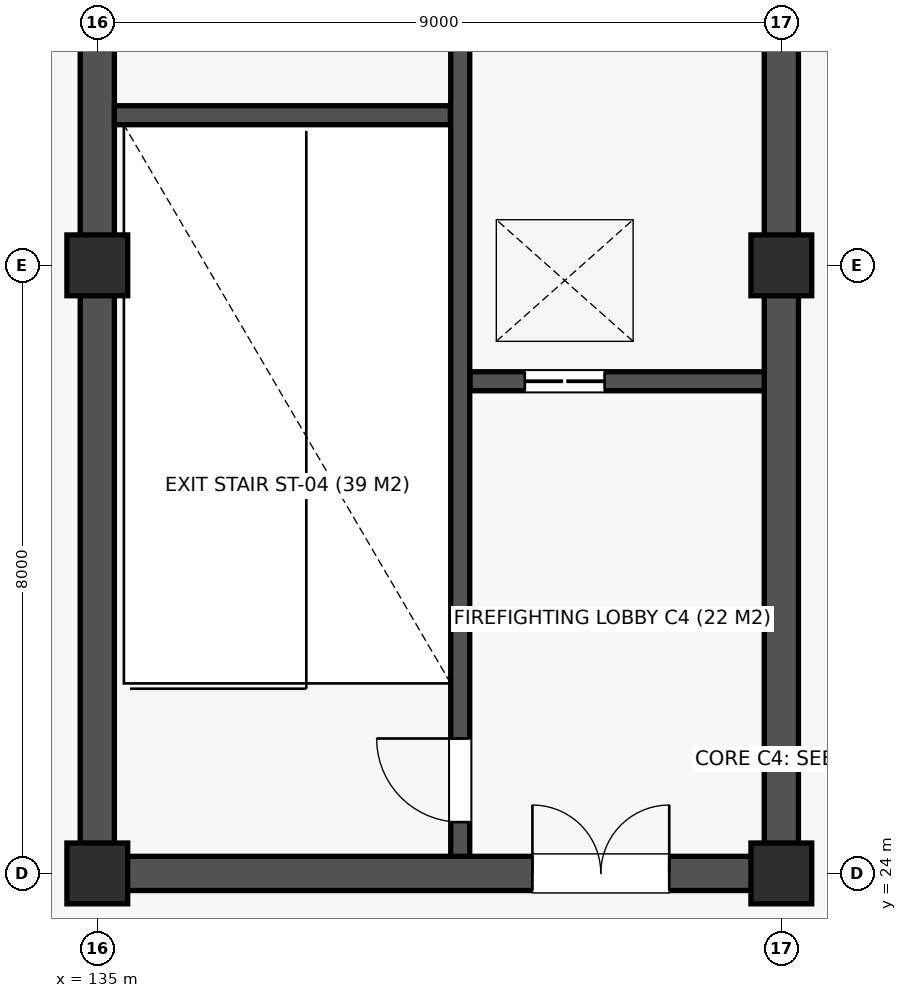
"""IFC4 building model, lengths in metres.
Left out: names, types, materials, properties, quantities, classifications, styles, units other than length and angle.
Written with IfcOpenShell. Run it as: python <this file> out.ifc"""

import sys

from ifc_helpers import new_model, si_unit, direction, frame, frame_2d, origin, origin_2d, place, context, subcontext, project, spatial, rectangle, extrude, element, fill, save


model = new_model("IFC4")
c1 = context("Model", 3, precision=1e-05, world=origin(), true_north=direction((0.0, 1.0)))
c2 = subcontext(c1, "Body", "Model", "MODEL_VIEW")
j1 = project(units=[si_unit("LENGTHUNIT", "METRE"), si_unit("PLANEANGLEUNIT", "RADIAN")], contexts=[c1])
p1 = place(None, origin())
s1 = spatial("IfcSite", under=j1, at=p1, CompositionType="ELEMENT")
p2 = place(p1, origin())
s2 = spatial("IfcBuilding", under=s1, at=p2, CompositionType="ELEMENT")
p3 = place(p2, frame((0.0, 0.0, 13.5)))
s3 = spatial("IfcBuildingStorey", under=s2, at=p3, CompositionType="ELEMENT", Elevation=13.5)
for number, where, z_axis, x_axis in (
    (1, (135.0, 24.0, 0.0), (0.0, 0.0, 1.0), (1.0, 0.0, 0.0)),
    (2, (135.0, 32.0, 0.0), (0.0, 0.0, 1.0), (1.0, 0.0, 0.0)),
    (3, (144.0, 24.0, 0.0), (0.0, 0.0, 1.0), (1.0, 0.0, 0.0)),
    (4, (144.0, 32.0, 0.0), (0.0, 0.0, 1.0), (1.0, 0.0, 0.0)),
):
    element("IfcColumn", number, at=place(p3, frame(where, z_axis=z_axis, x_axis=x_axis)), inside=s3, PredefinedType="COLUMN", context=c2, shape_type="SweptSolid", body=[
        extrude(rectangle(XDim=0.8, YDim=0.8, at=origin_2d()), origin(), (0.0, 0.0, 1.0), 4.2),
    ])
p4 = place(p3, frame((135.225, 24.0, 0.0), z_axis=(0.0, 0.0, 1.0), x_axis=(1.0, 0.0, 0.0)))
e5 = element("IfcWall", 5, at=p4, inside=s3, PredefinedType="SHEAR", context=c2, shape_type="SweptSolid", body=[
    extrude(rectangle(XDim=8.55, YDim=0.45, at=frame_2d((4.275, 0.0))), origin(), (0.0, 0.0, 1.0), 4.2),
])
p5 = place(p4, frame((5.5, 0.0, 0.0)))
e6 = element("IfcOpeningElement", 6, at=p5, cuts=e5, PredefinedType="OPENING", context=c2, shape_type="SweptSolid", body=[
    extrude(rectangle(XDim=1.8, YDim=2.18, at=frame_2d((0.9, 1.09))), frame((0.0, 0.237, 0.0), z_axis=(0.0, -1.0, 0.0), x_axis=(1.0, 0.0, 0.0)), (0.0, 0.0, 1.0), 0.474),
])
p6 = place(p3, frame((135.0, 24.225, 0.0), z_axis=(0.0, 0.0, 1.0), x_axis=(0.0, 1.0, 0.0)))
e7 = element("IfcWall", 7, at=p6, inside=s3, PredefinedType="SHEAR", context=c2, shape_type="SweptSolid", body=[
    extrude(rectangle(XDim=15.55, YDim=0.45, at=frame_2d((7.775, 0.0))), origin(), (0.0, 0.0, 1.0), 4.2),
])
p7 = place(p6, frame((11.2, 0.0, 0.0)))
e8 = element("IfcOpeningElement", 8, at=p7, cuts=e7, PredefinedType="OPENING", context=c2, shape_type="SweptSolid", body=[
    extrude(rectangle(XDim=0.95, YDim=2.1, at=frame_2d((0.475, 1.05))), frame((0.0, 0.237, 0.0), z_axis=(0.0, -1.0, 0.0), x_axis=(1.0, 0.0, 0.0)), (0.0, 0.0, 1.0), 0.474),
])
p8 = place(p3, frame((144.0, 24.225, 0.0), z_axis=(0.0, 0.0, 1.0), x_axis=(0.0, 1.0, 0.0)))
e9 = element("IfcWall", 9, at=p8, inside=s3, PredefinedType="SHEAR", context=c2, shape_type="SweptSolid", body=[
    extrude(rectangle(XDim=15.55, YDim=0.45, at=frame_2d((7.775, 0.0))), origin(), (0.0, 0.0, 1.0), 4.2),
])
p9 = place(p3, frame((139.775, 24.225, 0.0), z_axis=(0.0, 0.0, 1.0), x_axis=(0.0, 1.0, 0.0)))
e10 = element("IfcWall", 10, at=p9, inside=s3, PredefinedType="SOLIDWALL", context=c2, shape_type="SweptSolid", body=[
    extrude(rectangle(XDim=15.55, YDim=0.25, at=frame_2d((7.775, 0.0))), origin(), (0.0, 0.0, 1.0), 4.2),
])
p10 = place(p9, frame((0.45, 0.0, 0.0)))
e11 = element("IfcOpeningElement", 11, at=p10, cuts=e10, PredefinedType="OPENING", context=c2, shape_type="SweptSolid", body=[
    extrude(rectangle(XDim=1.1, YDim=2.15, at=frame_2d((0.55, 1.075))), frame((0.0, 0.137, 0.0), z_axis=(0.0, -1.0, 0.0), x_axis=(1.0, 0.0, 0.0)), (0.0, 0.0, 1.0), 0.274),
])
p11 = place(p3, frame((135.225, 33.975, 0.0), z_axis=(0.0, 0.0, 1.0), x_axis=(1.0, 0.0, 0.0)))
e12 = element("IfcWall", 12, at=p11, inside=s3, PredefinedType="SOLIDWALL", context=c2, shape_type="SweptSolid", body=[
    extrude(rectangle(XDim=4.42, YDim=0.25, at=frame_2d((2.21, 0.0))), origin(), (0.0, 0.0, 1.0), 4.2),
])
p12 = place(p3, frame((139.905, 30.475, 0.0), z_axis=(0.0, 0.0, 1.0), x_axis=(1.0, 0.0, 0.0)))
e13 = element("IfcWall", 13, at=p12, inside=s3, PredefinedType="SOLIDWALL", context=c2, shape_type="SweptSolid", body=[
    extrude(rectangle(XDim=3.87, YDim=0.25, at=frame_2d((1.935, 0.0))), origin(), (0.0, 0.0, 1.0), 4.2),
])
p13 = place(p12, frame((0.72, 0.0, 0.0)))
e14 = element("IfcOpeningElement", 14, at=p13, cuts=e13, PredefinedType="OPENING", context=c2, shape_type="SweptSolid", body=[
    extrude(rectangle(XDim=1.05, YDim=2.12, at=frame_2d((0.525, 1.06))), frame((0.0, 0.137, 0.0), z_axis=(0.0, -1.0, 0.0), x_axis=(1.0, 0.0, 0.0)), (0.0, 0.0, 1.0), 0.274),
])
p14 = place(p5, origin())
e15 = element("IfcDoor", 15, at=p14, inside=s3, OperationType="DOUBLE_DOOR_SINGLE_SWING", PredefinedType="DOOR", context=c2, shape_type="SweptSolid", body=[
    extrude(rectangle(XDim=1.8, YDim=2.18, at=frame_2d((0.9, 1.09))), frame((0.0, 0.025, 0.0), z_axis=(0.0, -1.0, 0.0), x_axis=(1.0, 0.0, 0.0)), (0.0, 0.0, 1.0), 0.05),
])
fill(e6, e15)
p15 = place(p10, origin())
e16 = element("IfcDoor", 16, at=p15, inside=s3, OperationType="SINGLE_SWING_RIGHT", PredefinedType="DOOR", context=c2, shape_type="SweptSolid", body=[
    extrude(rectangle(XDim=1.1, YDim=2.15, at=frame_2d((0.55, 1.075))), frame((0.0, 0.025, 0.0), z_axis=(0.0, -1.0, 0.0), x_axis=(1.0, 0.0, 0.0)), (0.0, 0.0, 1.0), 0.05),
])
fill(e11, e16)
p16 = place(p13, origin())
e17 = element("IfcDoor", 17, at=p16, inside=s3, OperationType="DOUBLE_DOOR_SLIDING", PredefinedType="DOOR", context=c2, shape_type="SweptSolid", body=[
    extrude(rectangle(XDim=1.05, YDim=2.12, at=frame_2d((0.525, 1.06))), frame((0.0, 0.025, 0.0), z_axis=(0.0, -1.0, 0.0), x_axis=(1.0, 0.0, 0.0)), (0.0, 0.0, 1.0), 0.05),
])
fill(e14, e17)
save(model, sys.argv[1])
